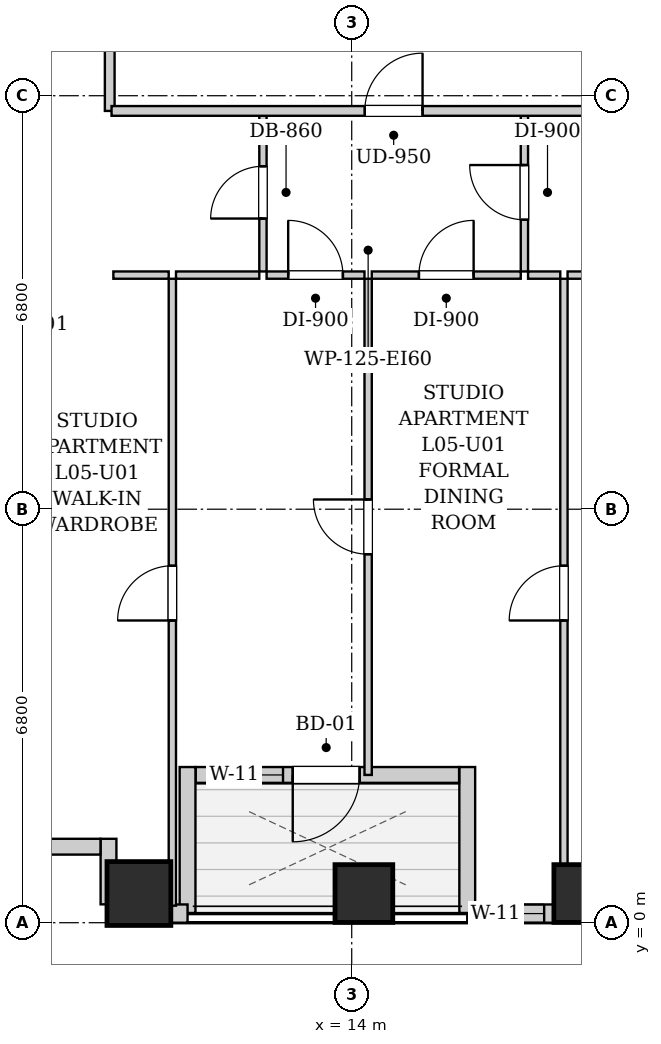
"""IFC4 building model, lengths in metres.
Left out: names, types, materials, properties, quantities, classifications, styles, units other than length and angle.
Written with IfcOpenShell. Run it as: python <this file> out.ifc"""

import sys

from ifc_helpers import new_model, si_unit, direction, frame, frame_2d, origin, origin_2d, place, context, subcontext, project, spatial, rectangle, extrude, element, fill, save


model = new_model("IFC4")
c1 = context("Model", 3, precision=1e-05, world=origin(), true_north=direction((0.0, 1.0)))
c2 = subcontext(c1, "Body", "Model", "MODEL_VIEW")
j1 = project(units=[si_unit("LENGTHUNIT", "METRE"), si_unit("PLANEANGLEUNIT", "RADIAN")], contexts=[c1])
p1 = place(None, origin())
s1 = spatial("IfcSite", under=j1, at=p1, CompositionType="ELEMENT")
p2 = place(p1, origin())
s2 = spatial("IfcBuilding", under=s1, at=p2, CompositionType="ELEMENT")
p3 = place(p2, frame((0.0, 0.0, 25.8)))
s3 = spatial("IfcBuildingStorey", under=s2, at=p3, CompositionType="ELEMENT", Elevation=25.8)
p4 = place(p3, frame((10.5, 0.48, 0.0), z_axis=(0.0, 0.0, 1.0), x_axis=(1.0, 0.0, 0.0)))
e1 = element("IfcColumn", 1, at=p4, inside=s3, PredefinedType="COLUMN", context=c2, shape_type="SweptSolid", body=[
    extrude(rectangle(XDim=1.05, YDim=1.05, at=origin_2d()), origin(), (0.0, 0.0, 1.0), 3.2),
])
for number, where, z_axis, x_axis in (
    (2, (14.2, 0.48, 0.0), (0.0, 0.0, 1.0), (1.0, 0.0, 0.0)),
    (3, (17.8, 0.48, 0.0), (0.0, 0.0, 1.0), (1.0, 0.0, 0.0)),
):
    element("IfcColumn", number, at=place(p3, frame(where, z_axis=z_axis, x_axis=x_axis)), inside=s3, PredefinedType="COLUMN", context=c2, shape_type="SweptSolid", body=[
        extrude(rectangle(XDim=0.95, YDim=0.95, at=origin_2d()), origin(), (0.0, 0.0, 1.0), 3.2),
    ])
p5 = place(p3, frame((44.0, 0.15, 0.0), z_axis=(0.0, 0.0, 1.0), x_axis=(-1.0, 0.0, 0.0)))
e4 = element("IfcWall", 4, at=p5, inside=s3, PredefinedType="SOLIDWALL", context=c2, shape_type="SweptSolid", body=[
    extrude(rectangle(XDim=28.1, YDim=0.3, at=frame_2d((14.05, 0.0))), origin(), (0.0, 0.0, 1.0), 1.975),
])
p6 = place(p5, frame((26.835, 0.0, 0.55)))
e5 = element("IfcOpeningElement", 5, at=p6, cuts=e4, PredefinedType="OPENING", context=c2, shape_type="SweptSolid", body=[
    extrude(rectangle(XDim=0.85, YDim=1.2, at=frame_2d((0.425, 0.6))), frame((0.0, 0.16, 0.0), z_axis=(0.0, -1.0, 0.0), x_axis=(1.0, 0.0, 0.0)), (0.0, 0.0, 1.0), 0.32),
])
p7 = place(p5, frame((23.765, 0.0, 0.55)))
e6 = element("IfcOpeningElement", 6, at=p7, cuts=e4, PredefinedType="OPENING", context=c2, shape_type="SweptSolid", body=[
    extrude(rectangle(XDim=1.8, YDim=1.2, at=frame_2d((0.9, 0.6))), frame((0.0, 0.16, 0.0), z_axis=(0.0, -1.0, 0.0), x_axis=(1.0, 0.0, 0.0)), (0.0, 0.0, 1.0), 0.32),
])
p8 = place(p5, frame((21.5, 0.0, 0.55)))
e7 = element("IfcOpeningElement", 7, at=p8, cuts=e4, PredefinedType="OPENING", context=c2, shape_type="SweptSolid", body=[
    extrude(rectangle(XDim=1.35, YDim=1.2, at=frame_2d((0.675, 0.6))), frame((0.0, 0.16, 0.0), z_axis=(0.0, -1.0, 0.0), x_axis=(1.0, 0.0, 0.0)), (0.0, 0.0, 1.0), 0.32),
])
p9 = place(p5, frame((14.352, 0.0, 0.55)))
e8 = element("IfcOpeningElement", 8, at=p9, cuts=e4, PredefinedType="OPENING", context=c2, shape_type="SweptSolid", body=[
    extrude(rectangle(XDim=1.8, YDim=1.2, at=frame_2d((0.9, 0.6))), frame((0.0, 0.16, 0.0), z_axis=(0.0, -1.0, 0.0), x_axis=(1.0, 0.0, 0.0)), (0.0, 0.0, 1.0), 0.32),
])
p10 = place(p5, frame((11.435, 0.0, 0.55)))
e9 = element("IfcOpeningElement", 9, at=p10, cuts=e4, PredefinedType="OPENING", context=c2, shape_type="SweptSolid", body=[
    extrude(rectangle(XDim=1.8, YDim=1.2, at=frame_2d((0.9, 0.6))), frame((0.0, 0.16, 0.0), z_axis=(0.0, -1.0, 0.0), x_axis=(1.0, 0.0, 0.0)), (0.0, 0.0, 1.0), 0.32),
])
p11 = place(p5, frame((7.891, 0.0, 0.55)))
e10 = element("IfcOpeningElement", 10, at=p11, cuts=e4, PredefinedType="OPENING", context=c2, shape_type="SweptSolid", body=[
    extrude(rectangle(XDim=1.8, YDim=1.2, at=frame_2d((0.9, 0.6))), frame((0.0, 0.16, 0.0), z_axis=(0.0, -1.0, 0.0), x_axis=(1.0, 0.0, 0.0)), (0.0, 0.0, 1.0), 0.32),
])
p12 = place(p5, frame((4.315, 0.0, 0.55)))
e11 = element("IfcOpeningElement", 11, at=p12, cuts=e4, PredefinedType="OPENING", context=c2, shape_type="SweptSolid", body=[
    extrude(rectangle(XDim=0.85, YDim=1.2, at=frame_2d((0.425, 0.6))), frame((0.0, 0.16, 0.0), z_axis=(0.0, -1.0, 0.0), x_axis=(1.0, 0.0, 0.0)), (0.0, 0.0, 1.0), 0.32),
])
p13 = place(p3, frame((15.9, 0.16, 0.0), z_axis=(0.0, 0.0, 1.0), x_axis=(0.0, 1.0, 0.0)))
e12 = element("IfcWall", 12, at=p13, inside=s3, PredefinedType="SOLIDWALL", context=c2, shape_type="SweptSolid", body=[
    extrude(rectangle(XDim=2.4, YDim=0.26, at=frame_2d((1.2, 0.0))), origin(), (0.0, 0.0, 1.0), 2.94),
])
p14 = place(p3, frame((15.766, 2.43, 0.0), z_axis=(0.0, 0.0, 1.0), x_axis=(-1.0, 0.0, 0.0)))
e13 = element("IfcWall", 13, at=p14, inside=s3, PredefinedType="SOLIDWALL", context=c2, shape_type="SweptSolid", body=[
    extrude(rectangle(XDim=4.332, YDim=0.26, at=frame_2d((2.166, 0.0))), origin(), (0.0, 0.0, 1.0), 2.94),
])
p15 = place(p14, frame((1.636, 0.0, 0.0)))
e14 = element("IfcOpeningElement", 14, at=p15, cuts=e13, PredefinedType="OPENING", context=c2, shape_type="SweptSolid", body=[
    extrude(rectangle(XDim=1.1, YDim=2.0, at=frame_2d((0.55, 1.0))), frame((0.0, 0.14, 0.0), z_axis=(0.0, -1.0, 0.0), x_axis=(1.0, 0.0, 0.0)), (0.0, 0.0, 1.0), 0.28),
])
p16 = place(p14, frame((2.896, 0.0, 0.55)))
e15 = element("IfcOpeningElement", 15, at=p16, cuts=e13, PredefinedType="OPENING", context=c2, shape_type="SweptSolid", body=[
    extrude(rectangle(XDim=0.85, YDim=1.2, at=frame_2d((0.425, 0.6))), frame((0.0, 0.14, 0.0), z_axis=(0.0, -1.0, 0.0), x_axis=(1.0, 0.0, 0.0)), (0.0, 0.0, 1.0), 0.28),
])
p17 = place(p3, frame((11.3, 2.56, 0.0), z_axis=(0.0, 0.0, 1.0), x_axis=(0.0, -1.0, 0.0)))
e16 = element("IfcWall", 16, at=p17, inside=s3, PredefinedType="SOLIDWALL", context=c2, shape_type="SweptSolid", body=[
    extrude(rectangle(XDim=2.4, YDim=0.26, at=frame_2d((1.2, 0.0))), origin(), (0.0, 0.0, 1.0), 2.94),
])
p18 = place(p3, frame((11.3, 0.15, 0.0), z_axis=(0.0, 0.0, 1.0), x_axis=(-1.0, 0.0, 0.0)))
e17 = element("IfcWall", 17, at=p18, inside=s3, PredefinedType="SOLIDWALL", context=c2, shape_type="SweptSolid", body=[
    extrude(rectangle(XDim=1.3, YDim=0.3, at=frame_2d((0.65, 0.0))), origin(), (0.0, 0.0, 1.0), 1.975),
])
p19 = place(p3, frame((10.0, 0.302, 0.0), z_axis=(0.0, 0.0, 1.0), x_axis=(0.0, 1.0, 0.0)))
e18 = element("IfcWall", 18, at=p19, inside=s3, PredefinedType="SOLIDWALL", context=c2, shape_type="SweptSolid", body=[
    extrude(rectangle(XDim=1.078, YDim=0.26, at=frame_2d((0.539, 0.0))), origin(), (0.0, 0.0, 1.0), 2.94),
])
p20 = place(p3, frame((9.868, 1.25, 0.0), z_axis=(0.0, 0.0, 1.0), x_axis=(-1.0, 0.0, 0.0)))
e19 = element("IfcWall", 19, at=p20, inside=s3, PredefinedType="SOLIDWALL", context=c2, shape_type="SweptSolid", body=[
    extrude(rectangle(XDim=1.248, YDim=0.26, at=frame_2d((0.624, 0.0))), origin(), (0.0, 0.0, 1.0), 2.94),
])
p21 = place(p3, frame((10.02, 13.35, 0.0), z_axis=(0.0, 0.0, 1.0), x_axis=(0.0, 1.0, 0.0)))
e20 = element("IfcWall", 20, at=p21, inside=s3, PredefinedType="PARTITIONING", context=c2, shape_type="SweptSolid", body=[
    extrude(rectangle(XDim=1.74, YDim=0.16, at=frame_2d((0.87, 0.0))), origin(), (0.0, 0.0, 1.0), 2.94),
])
p22 = place(p3, frame((12.54, 10.71, 0.0), z_axis=(0.0, 0.0, 1.0), x_axis=(0.0, 1.0, 0.0)))
e21 = element("IfcWall", 21, at=p22, inside=s3, PredefinedType="PARTITIONING", context=c2, shape_type="SweptSolid", body=[
    extrude(rectangle(XDim=2.6, YDim=0.12, at=frame_2d((1.3, 0.0))), origin(), (0.0, 0.0, 1.0), 2.94),
])
p23 = place(p22, frame((0.87, 0.0, 0.0)))
e22 = element("IfcOpeningElement", 22, at=p23, cuts=e21, PredefinedType="OPENING", context=c2, shape_type="SweptSolid", body=[
    extrude(rectangle(XDim=0.86, YDim=2.05, at=frame_2d((0.43, 1.025))), frame((0.0, 0.07, 0.0), z_axis=(0.0, -1.0, 0.0), x_axis=(1.0, 0.0, 0.0)), (0.0, 0.0, 1.0), 0.14),
])
p24 = place(p3, frame((10.08, 10.65, 0.0), z_axis=(0.0, 0.0, 1.0), x_axis=(1.0, 0.0, 0.0)))
e23 = element("IfcWall", 23, at=p24, inside=s3, PredefinedType="PARTITIONING", context=c2, shape_type="SweptSolid", body=[
    extrude(rectangle(XDim=0.91, YDim=0.12, at=frame_2d((0.455, 0.0))), origin(), (0.0, 0.0, 1.0), 2.94),
])
p25 = place(p3, frame((11.11, 10.65, 0.0), z_axis=(0.0, 0.0, 1.0), x_axis=(1.0, 0.0, 0.0)))
e24 = element("IfcWall", 24, at=p25, inside=s3, PredefinedType="PARTITIONING", context=c2, shape_type="SweptSolid", body=[
    extrude(rectangle(XDim=1.37, YDim=0.12, at=frame_2d((0.685, 0.0))), origin(), (0.0, 0.0, 1.0), 2.94),
])
p26 = place(p3, frame((16.84, 10.71, 0.0), z_axis=(0.0, 0.0, 1.0), x_axis=(0.0, 1.0, 0.0)))
e25 = element("IfcWall", 25, at=p26, inside=s3, PredefinedType="PARTITIONING", context=c2, shape_type="SweptSolid", body=[
    extrude(rectangle(XDim=2.6, YDim=0.12, at=frame_2d((1.3, 0.0))), origin(), (0.0, 0.0, 1.0), 2.94),
])
p27 = place(p26, frame((0.85, 0.0, 0.0)))
e26 = element("IfcOpeningElement", 26, at=p27, cuts=e25, PredefinedType="OPENING", context=c2, shape_type="SweptSolid", body=[
    extrude(rectangle(XDim=0.9, YDim=2.05, at=frame_2d((0.45, 1.025))), frame((0.0, 0.07, 0.0), z_axis=(0.0, -1.0, 0.0), x_axis=(1.0, 0.0, 0.0)), (0.0, 0.0, 1.0), 0.14),
])
p28 = place(p3, frame((12.6, 10.65, 0.0), z_axis=(0.0, 0.0, 1.0), x_axis=(1.0, 0.0, 0.0)))
e27 = element("IfcWall", 27, at=p28, inside=s3, PredefinedType="PARTITIONING", context=c2, shape_type="SweptSolid", body=[
    extrude(rectangle(XDim=1.61, YDim=0.12, at=frame_2d((0.805, 0.0))), origin(), (0.0, 0.0, 1.0), 2.94),
])
p29 = place(p28, frame((0.355, 0.0, 0.0)))
e28 = element("IfcOpeningElement", 28, at=p29, cuts=e27, PredefinedType="OPENING", context=c2, shape_type="SweptSolid", body=[
    extrude(rectangle(XDim=0.9, YDim=2.05, at=frame_2d((0.45, 1.025))), frame((0.0, 0.07, 0.0), z_axis=(0.0, -1.0, 0.0), x_axis=(1.0, 0.0, 0.0)), (0.0, 0.0, 1.0), 0.14),
])
p30 = place(p3, frame((14.33, 10.65, 0.0), z_axis=(0.0, 0.0, 1.0), x_axis=(1.0, 0.0, 0.0)))
e29 = element("IfcWall", 29, at=p30, inside=s3, PredefinedType="PARTITIONING", context=c2, shape_type="SweptSolid", body=[
    extrude(rectangle(XDim=2.45, YDim=0.12, at=frame_2d((1.225, 0.0))), origin(), (0.0, 0.0, 1.0), 2.94),
])
p31 = place(p30, frame((0.775, 0.0, 0.0)))
e30 = element("IfcOpeningElement", 30, at=p31, cuts=e29, PredefinedType="OPENING", context=c2, shape_type="SweptSolid", body=[
    extrude(rectangle(XDim=0.9, YDim=2.05, at=frame_2d((0.45, 1.025))), frame((0.0, 0.07, 0.0), z_axis=(0.0, -1.0, 0.0), x_axis=(1.0, 0.0, 0.0)), (0.0, 0.0, 1.0), 0.14),
])
p32 = place(p3, frame((16.9, 10.65, 0.0), z_axis=(0.0, 0.0, 1.0), x_axis=(1.0, 0.0, 0.0)))
e31 = element("IfcWall", 31, at=p32, inside=s3, PredefinedType="PARTITIONING", context=c2, shape_type="SweptSolid", body=[
    extrude(rectangle(XDim=0.53, YDim=0.12, at=frame_2d((0.265, 0.0))), origin(), (0.0, 0.0, 1.0), 2.94),
])
p33 = place(p3, frame((17.55, 10.65, 0.0), z_axis=(0.0, 0.0, 1.0), x_axis=(1.0, 0.0, 0.0)))
e32 = element("IfcWall", 32, at=p33, inside=s3, PredefinedType="PARTITIONING", context=c2, shape_type="SweptSolid", body=[
    extrude(rectangle(XDim=2.95, YDim=0.12, at=frame_2d((1.475, 0.0))), origin(), (0.0, 0.0, 1.0), 2.94),
])
p34 = place(p33, frame((1.025, 0.0, 0.0)))
e33 = element("IfcOpeningElement", 33, at=p34, cuts=e32, PredefinedType="OPENING", context=c2, shape_type="SweptSolid", body=[
    extrude(rectangle(XDim=0.9, YDim=2.05, at=frame_2d((0.45, 1.025))), frame((0.0, 0.07, 0.0), z_axis=(0.0, -1.0, 0.0), x_axis=(1.0, 0.0, 0.0)), (0.0, 0.0, 1.0), 0.14),
])
p35 = place(p3, frame((11.05, 0.28, 0.0), z_axis=(0.0, 0.0, 1.0), x_axis=(0.0, 1.0, 0.0)))
e34 = element("IfcWall", 34, at=p35, inside=s3, PredefinedType="PARTITIONING", context=c2, shape_type="SweptSolid", body=[
    extrude(rectangle(XDim=10.31, YDim=0.12, at=frame_2d((5.155, 0.0))), origin(), (0.0, 0.0, 1.0), 2.94),
])
p36 = place(p35, frame((4.69, 0.0, 0.0)))
e35 = element("IfcOpeningElement", 35, at=p36, cuts=e34, PredefinedType="OPENING", context=c2, shape_type="SweptSolid", body=[
    extrude(rectangle(XDim=0.9, YDim=2.05, at=frame_2d((0.45, 1.025))), frame((0.0, 0.07, 0.0), z_axis=(0.0, -1.0, 0.0), x_axis=(1.0, 0.0, 0.0)), (0.0, 0.0, 1.0), 0.14),
])
p37 = place(p3, frame((14.27, 2.43, 0.0), z_axis=(0.0, 0.0, 1.0), x_axis=(0.0, 1.0, 0.0)))
e36 = element("IfcWall", 36, at=p37, inside=s3, PredefinedType="PARTITIONING", context=c2, shape_type="SweptSolid", body=[
    extrude(rectangle(XDim=8.16, YDim=0.12, at=frame_2d((4.08, 0.0))), origin(), (0.0, 0.0, 1.0), 2.94),
])
p38 = place(p37, frame((3.63, 0.0, 0.0)))
e37 = element("IfcOpeningElement", 37, at=p38, cuts=e36, PredefinedType="OPENING", context=c2, shape_type="SweptSolid", body=[
    extrude(rectangle(XDim=0.9, YDim=2.05, at=frame_2d((0.45, 1.025))), frame((0.0, 0.07, 0.0), z_axis=(0.0, -1.0, 0.0), x_axis=(1.0, 0.0, 0.0)), (0.0, 0.0, 1.0), 0.14),
])
p39 = place(p3, frame((17.49, 0.28, 0.0), z_axis=(0.0, 0.0, 1.0), x_axis=(0.0, 1.0, 0.0)))
e38 = element("IfcWall", 38, at=p39, inside=s3, PredefinedType="PARTITIONING", context=c2, shape_type="SweptSolid", body=[
    extrude(rectangle(XDim=10.31, YDim=0.12, at=frame_2d((5.155, 0.0))), origin(), (0.0, 0.0, 1.0), 2.94),
])
p40 = place(p39, frame((4.69, 0.0, 0.0)))
e39 = element("IfcOpeningElement", 39, at=p40, cuts=e38, PredefinedType="OPENING", context=c2, shape_type="SweptSolid", body=[
    extrude(rectangle(XDim=0.9, YDim=2.05, at=frame_2d((0.45, 1.025))), frame((0.0, 0.07, 0.0), z_axis=(0.0, -1.0, 0.0), x_axis=(1.0, 0.0, 0.0)), (0.0, 0.0, 1.0), 0.14),
])
p41 = place(p3, frame((10.05, 13.35, 0.0), z_axis=(0.0, 0.0, 1.0), x_axis=(1.0, 0.0, 0.0)))
e40 = element("IfcWall", 40, at=p41, inside=s3, PredefinedType="PARTITIONING", context=c2, shape_type="SweptSolid", body=[
    extrude(rectangle(XDim=33.9, YDim=0.16, at=frame_2d((16.95, 0.0))), origin(), (0.0, 0.0, 1.0), 2.94),
])
p42 = place(p41, frame((4.165, 0.0, 0.0)))
e41 = element("IfcOpeningElement", 41, at=p42, cuts=e40, PredefinedType="OPENING", context=c2, shape_type="SweptSolid", body=[
    extrude(rectangle(XDim=0.95, YDim=2.1, at=frame_2d((0.475, 1.05))), frame((0.0, 0.09, 0.0), z_axis=(0.0, -1.0, 0.0), x_axis=(1.0, 0.0, 0.0)), (0.0, 0.0, 1.0), 0.18),
])
p43 = place(p23, origin())
e42 = element("IfcDoor", 42, at=p43, inside=s3, OperationType="SINGLE_SWING_LEFT", PredefinedType="DOOR", context=c2, shape_type="SweptSolid", body=[
    extrude(rectangle(XDim=0.86, YDim=2.05, at=frame_2d((0.43, 1.025))), frame((0.0, 0.025, 0.0), z_axis=(0.0, -1.0, 0.0), x_axis=(1.0, 0.0, 0.0)), (0.0, 0.0, 1.0), 0.05),
])
fill(e22, e42)
p44 = place(p27, origin())
e43 = element("IfcDoor", 43, at=p44, inside=s3, OperationType="SINGLE_SWING_RIGHT", PredefinedType="DOOR", context=c2, shape_type="SweptSolid", body=[
    extrude(rectangle(XDim=0.9, YDim=2.05, at=frame_2d((0.45, 1.025))), frame((0.0, 0.025, 0.0), z_axis=(0.0, -1.0, 0.0), x_axis=(1.0, 0.0, 0.0)), (0.0, 0.0, 1.0), 0.05),
])
fill(e26, e43)
p45 = place(p29, origin())
e44 = element("IfcDoor", 44, at=p45, inside=s3, OperationType="SINGLE_SWING_LEFT", PredefinedType="DOOR", context=c2, shape_type="SweptSolid", body=[
    extrude(rectangle(XDim=0.9, YDim=2.05, at=frame_2d((0.45, 1.025))), frame((0.0, 0.025, 0.0), z_axis=(0.0, -1.0, 0.0), x_axis=(1.0, 0.0, 0.0)), (0.0, 0.0, 1.0), 0.05),
])
fill(e28, e44)
p46 = place(p31, origin())
e45 = element("IfcDoor", 45, at=p46, inside=s3, OperationType="SINGLE_SWING_RIGHT", PredefinedType="DOOR", context=c2, shape_type="SweptSolid", body=[
    extrude(rectangle(XDim=0.9, YDim=2.05, at=frame_2d((0.45, 1.025))), frame((0.0, 0.025, 0.0), z_axis=(0.0, -1.0, 0.0), x_axis=(1.0, 0.0, 0.0)), (0.0, 0.0, 1.0), 0.05),
])
fill(e30, e45)
p47 = place(p36, origin())
e46 = element("IfcDoor", 46, at=p47, inside=s3, OperationType="SINGLE_SWING_LEFT", PredefinedType="DOOR", context=c2, shape_type="SweptSolid", body=[
    extrude(rectangle(XDim=0.9, YDim=2.05, at=frame_2d((0.45, 1.025))), frame((0.0, 0.025, 0.0), z_axis=(0.0, -1.0, 0.0), x_axis=(1.0, 0.0, 0.0)), (0.0, 0.0, 1.0), 0.05),
])
fill(e35, e46)
p48 = place(p38, origin())
e47 = element("IfcDoor", 47, at=p48, inside=s3, OperationType="SINGLE_SWING_RIGHT", PredefinedType="DOOR", context=c2, shape_type="SweptSolid", body=[
    extrude(rectangle(XDim=0.9, YDim=2.05, at=frame_2d((0.45, 1.025))), frame((0.0, 0.025, 0.0), z_axis=(0.0, -1.0, 0.0), x_axis=(1.0, 0.0, 0.0)), (0.0, 0.0, 1.0), 0.05),
])
fill(e37, e47)
p49 = place(p40, origin())
e48 = element("IfcDoor", 48, at=p49, inside=s3, OperationType="SINGLE_SWING_LEFT", PredefinedType="DOOR", context=c2, shape_type="SweptSolid", body=[
    extrude(rectangle(XDim=0.9, YDim=2.05, at=frame_2d((0.45, 1.025))), frame((0.0, 0.025, 0.0), z_axis=(0.0, -1.0, 0.0), x_axis=(1.0, 0.0, 0.0)), (0.0, 0.0, 1.0), 0.05),
])
fill(e39, e48)
p50 = place(p42, origin())
e49 = element("IfcDoor", 49, at=p50, inside=s3, OperationType="SINGLE_SWING_RIGHT", PredefinedType="DOOR", context=c2, shape_type="SweptSolid", body=[
    extrude(rectangle(XDim=0.95, YDim=2.1, at=frame_2d((0.475, 1.05))), frame((0.0, 0.025, 0.0), z_axis=(0.0, -1.0, 0.0), x_axis=(1.0, 0.0, 0.0)), (0.0, 0.0, 1.0), 0.05),
])
fill(e41, e49)
p51 = place(p15, origin())
e50 = element("IfcDoor", 50, at=p51, inside=s3, OperationType="SINGLE_SWING_RIGHT", PredefinedType="DOOR", context=c2, shape_type="SweptSolid", body=[
    extrude(rectangle(XDim=1.1, YDim=2.0, at=frame_2d((0.55, 1.0))), frame((0.0, 0.025, 0.0), z_axis=(0.0, -1.0, 0.0), x_axis=(1.0, 0.0, 0.0)), (0.0, 0.0, 1.0), 0.05),
])
fill(e14, e50)
p52 = place(p16, origin())
e51 = element("IfcWindow", 51, at=p52, inside=s3, PartitioningType="SINGLE_PANEL", PredefinedType="WINDOW", context=c2, shape_type="SweptSolid", body=[
    extrude(rectangle(XDim=0.85, YDim=1.2, at=frame_2d((0.425, 0.6))), frame((0.0, 0.03, 0.0), z_axis=(0.0, -1.0, 0.0), x_axis=(1.0, 0.0, 0.0)), (0.0, 0.0, 1.0), 0.06),
])
fill(e15, e51)
p53 = place(p6, origin())
e52 = element("IfcWindow", 52, at=p53, inside=s3, PartitioningType="SINGLE_PANEL", PredefinedType="WINDOW", context=c2, shape_type="SweptSolid", body=[
    extrude(rectangle(XDim=0.85, YDim=1.2, at=frame_2d((0.425, 0.6))), frame((0.0, 0.03, 0.0), z_axis=(0.0, -1.0, 0.0), x_axis=(1.0, 0.0, 0.0)), (0.0, 0.0, 1.0), 0.06),
])
fill(e5, e52)
save(model, sys.argv[1])
